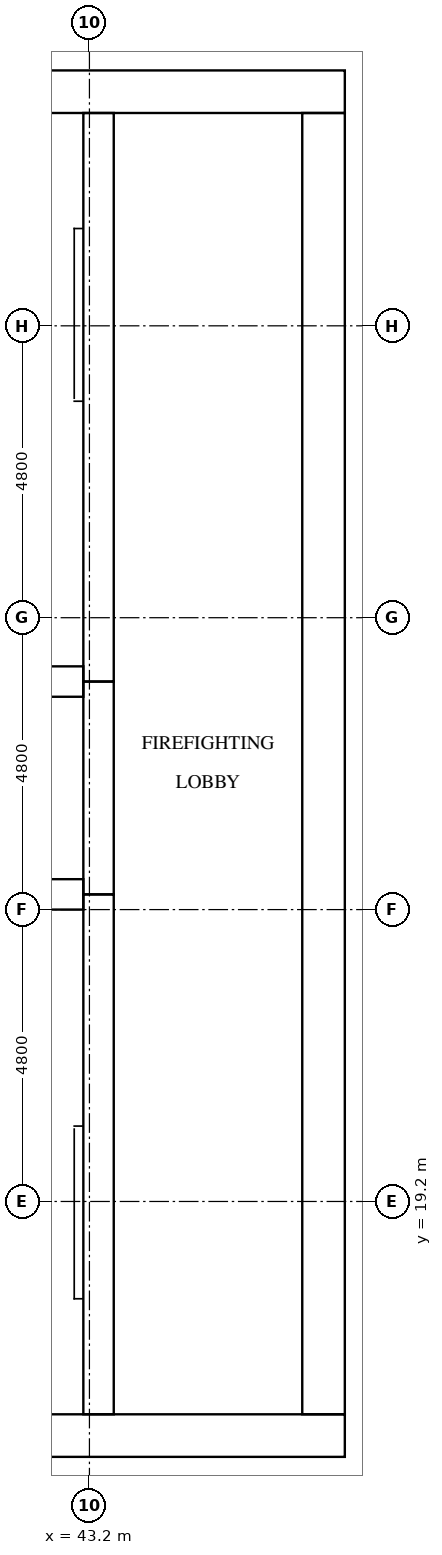
"""IFC4 building model, lengths in metres.
Left out: names, types, materials, properties, quantities, classifications, styles, units other than length and angle.
Written with IfcOpenShell. Run it as: python <this file> out.ifc"""

import sys

from ifc_helpers import new_model, si_unit, direction, frame, frame_2d, origin, place, context, subcontext, project, spatial, rectangle, extrude, element, fill, save


model = new_model("IFC4")
c1 = context("Model", 3, precision=1e-05, world=origin(), true_north=direction((0.0, 1.0)))
c2 = subcontext(c1, "Body", "Model", "MODEL_VIEW")
j1 = project(units=[si_unit("LENGTHUNIT", "METRE"), si_unit("PLANEANGLEUNIT", "RADIAN")], contexts=[c1])
p1 = place(None, origin())
s1 = spatial("IfcSite", under=j1, at=p1, CompositionType="ELEMENT")
p2 = place(p1, origin())
s2 = spatial("IfcBuilding", under=s1, at=p2, CompositionType="ELEMENT")
p3 = place(p2, frame((0.0, 0.0, 199.9)))
s3 = spatial("IfcBuildingStorey", under=s2, at=p3, CompositionType="ELEMENT", Elevation=199.9)
p4 = place(p3, frame((15.0, 15.35, 0.0), z_axis=(0.0, 0.0, 1.0), x_axis=(1.0, 0.0, 0.0)))
e1 = element("IfcWall", 1, at=p4, inside=s3, PredefinedType="SHEAR", context=c2, shape_type="SweptSolid", body=[
    extrude(rectangle(XDim=32.4, YDim=0.7, at=frame_2d((16.2, 0.0))), origin(), (0.0, 0.0, 1.0), 3.1),
])
p5 = place(p4, frame((15.3, 0.0, 0.0)))
e2 = element("IfcOpeningElement", 2, at=p5, cuts=e1, PredefinedType="OPENING", context=c2, shape_type="SweptSolid", body=[
    extrude(rectangle(XDim=1.8, YDim=2.1, at=frame_2d((0.9, 1.05))), frame((0.0, 0.36, 0.0), z_axis=(0.0, -1.0, 0.0), x_axis=(1.0, 0.0, 0.0)), (0.0, 0.0, 1.0), 0.72),
])
p6 = place(p3, frame((15.0, 37.45, 0.0), z_axis=(0.0, 0.0, 1.0), x_axis=(1.0, 0.0, 0.0)))
e3 = element("IfcWall", 3, at=p6, inside=s3, PredefinedType="SHEAR", context=c2, shape_type="SweptSolid", body=[
    extrude(rectangle(XDim=32.4, YDim=0.7, at=frame_2d((16.2, 0.0))), origin(), (0.0, 0.0, 1.0), 3.1),
])
p7 = place(p6, frame((15.3, 0.0, 0.0)))
e4 = element("IfcOpeningElement", 4, at=p7, cuts=e3, PredefinedType="OPENING", context=c2, shape_type="SweptSolid", body=[
    extrude(rectangle(XDim=1.8, YDim=2.1, at=frame_2d((0.9, 1.05))), frame((0.0, 0.36, 0.0), z_axis=(0.0, -1.0, 0.0), x_axis=(1.0, 0.0, 0.0)), (0.0, 0.0, 1.0), 0.72),
])
p8 = place(p6, frame((1.544, 0.0, 0.0)))
e5 = element("IfcOpeningElement", 5, at=p8, cuts=e3, PredefinedType="OPENING", context=c2, shape_type="SweptSolid", body=[
    extrude(rectangle(XDim=1.0, YDim=2.1, at=frame_2d((0.5, 1.05))), frame((0.0, 0.36, 0.0), z_axis=(0.0, -1.0, 0.0), x_axis=(1.0, 0.0, 0.0)), (0.0, 0.0, 1.0), 0.72),
])
p9 = place(p6, frame((5.219, 0.0, 0.0)))
e6 = element("IfcOpeningElement", 6, at=p9, cuts=e3, PredefinedType="OPENING", context=c2, shape_type="SweptSolid", body=[
    extrude(rectangle(XDim=1.0, YDim=2.1, at=frame_2d((0.5, 1.05))), frame((0.0, 0.36, 0.0), z_axis=(0.0, -1.0, 0.0), x_axis=(1.0, 0.0, 0.0)), (0.0, 0.0, 1.0), 0.72),
])
p10 = place(p3, frame((47.05, 15.7, 0.0), z_axis=(0.0, 0.0, 1.0), x_axis=(0.0, 1.0, 0.0)))
e7 = element("IfcWall", 7, at=p10, inside=s3, PredefinedType="SHEAR", context=c2, shape_type="SweptSolid", body=[
    extrude(rectangle(XDim=21.4, YDim=0.7, at=frame_2d((10.7, 0.0))), origin(), (0.0, 0.0, 1.0), 3.1),
])
p11 = place(p10, frame((10.4, 0.0, 0.0)))
e8 = element("IfcOpeningElement", 8, at=p11, cuts=e7, PredefinedType="OPENING", context=c2, shape_type="SweptSolid", body=[
    extrude(rectangle(XDim=1.2, YDim=2.1, at=frame_2d((0.6, 1.05))), frame((0.0, 0.36, 0.0), z_axis=(0.0, -1.0, 0.0), x_axis=(1.0, 0.0, 0.0)), (0.0, 0.0, 1.0), 0.72),
])
p12 = place(p3, frame((43.35, 15.7, 0.0), z_axis=(0.0, 0.0, 1.0), x_axis=(0.0, 1.0, 0.0)))
e9 = element("IfcWall", 9, at=p12, inside=s3, PredefinedType="SHEAR", context=c2, shape_type="SweptSolid", body=[
    extrude(rectangle(XDim=8.55, YDim=0.5, at=frame_2d((4.275, 0.0))), origin(), (0.0, 0.0, 1.0), 3.1),
])
p13 = place(p12, frame((0.5, 0.0, 0.0)))
e10 = element("IfcOpeningElement", 10, at=p13, cuts=e9, PredefinedType="OPENING", context=c2, shape_type="SweptSolid", body=[
    extrude(rectangle(XDim=1.2, YDim=2.1, at=frame_2d((0.6, 1.05))), frame((0.0, 0.26, 0.0), z_axis=(0.0, -1.0, 0.0), x_axis=(1.0, 0.0, 0.0)), (0.0, 0.0, 1.0), 0.52),
])
p14 = place(p3, frame((43.35, 24.25, 0.0), z_axis=(0.0, 0.0, 1.0), x_axis=(0.0, 1.0, 0.0)))
e11 = element("IfcWall", 11, at=p14, inside=s3, PredefinedType="SHEAR", context=c2, shape_type="SweptSolid", body=[
    extrude(rectangle(XDim=3.5, YDim=0.5, at=frame_2d((1.75, 0.0))), origin(), (0.0, 0.0, 1.0), 3.1),
])
p15 = place(p14, frame((1.2, 0.0, 0.0)))
e12 = element("IfcOpeningElement", 12, at=p15, cuts=e11, PredefinedType="OPENING", context=c2, shape_type="SweptSolid", body=[
    extrude(rectangle(XDim=1.1, YDim=2.1, at=frame_2d((0.55, 1.05))), frame((0.0, 0.26, 0.0), z_axis=(0.0, -1.0, 0.0), x_axis=(1.0, 0.0, 0.0)), (0.0, 0.0, 1.0), 0.52),
])
p16 = place(p3, frame((43.35, 27.75, 0.0), z_axis=(0.0, 0.0, 1.0), x_axis=(0.0, 1.0, 0.0)))
e13 = element("IfcWall", 13, at=p16, inside=s3, PredefinedType="SHEAR", context=c2, shape_type="SweptSolid", body=[
    extrude(rectangle(XDim=9.35, YDim=0.5, at=frame_2d((4.675, 0.0))), origin(), (0.0, 0.0, 1.0), 3.1),
])
p17 = place(p16, frame((7.65, 0.0, 0.0)))
e14 = element("IfcOpeningElement", 14, at=p17, cuts=e13, PredefinedType="OPENING", context=c2, shape_type="SweptSolid", body=[
    extrude(rectangle(XDim=1.2, YDim=2.1, at=frame_2d((0.6, 1.05))), frame((0.0, 0.26, 0.0), z_axis=(0.0, -1.0, 0.0), x_axis=(1.0, 0.0, 0.0)), (0.0, 0.0, 1.0), 0.52),
])
for number, where, z_axis, x_axis in (
    (15, (39.55, 24.25, 0.0), (0.0, 0.0, 1.0), (1.0, 0.0, 0.0)),
    (16, (39.55, 27.75, 0.0), (0.0, 0.0, 1.0), (1.0, 0.0, 0.0)),
):
    element("IfcWall", number, at=place(p3, frame(where, z_axis=z_axis, x_axis=x_axis)), inside=s3, PredefinedType="SHEAR", context=c2, shape_type="SweptSolid", body=[
        extrude(rectangle(XDim=3.55, YDim=0.5, at=frame_2d((1.775, 0.0))), origin(), (0.0, 0.0, 1.0), 3.1),
    ])
p18 = place(p15, origin())
e17 = element("IfcDoor", 17, at=p18, inside=s3, OperationType="DOUBLE_DOOR_SLIDING", PredefinedType="DOOR", context=c2, shape_type="SweptSolid", body=[
    extrude(rectangle(XDim=1.1, YDim=2.1, at=frame_2d((0.55, 1.05))), frame((0.0, 0.025, 0.0), z_axis=(0.0, -1.0, 0.0), x_axis=(1.0, 0.0, 0.0)), (0.0, 0.0, 1.0), 0.05),
])
fill(e12, e17)
p19 = place(p13, origin())
e18 = element("IfcDoor", 18, at=p19, inside=s3, OperationType="SINGLE_SWING_LEFT", PredefinedType="DOOR", context=c2, shape_type="SweptSolid", body=[
    extrude(rectangle(XDim=1.2, YDim=2.1, at=frame_2d((0.6, 1.05))), frame((0.0, 0.025, 0.0), z_axis=(0.0, -1.0, 0.0), x_axis=(1.0, 0.0, 0.0)), (0.0, 0.0, 1.0), 0.05),
])
fill(e10, e18)
p20 = place(p17, origin())
e19 = element("IfcDoor", 19, at=p20, inside=s3, OperationType="SINGLE_SWING_RIGHT", PredefinedType="DOOR", context=c2, shape_type="SweptSolid", body=[
    extrude(rectangle(XDim=1.2, YDim=2.1, at=frame_2d((0.6, 1.05))), frame((0.0, 0.025, 0.0), z_axis=(0.0, -1.0, 0.0), x_axis=(1.0, 0.0, 0.0)), (0.0, 0.0, 1.0), 0.05),
])
fill(e14, e19)
p21 = place(p11, origin())
e20 = element("IfcDoor", 20, at=p21, inside=s3, OperationType="SINGLE_SWING_RIGHT", PredefinedType="DOOR", context=c2, shape_type="SweptSolid", body=[
    extrude(rectangle(XDim=1.2, YDim=2.1, at=frame_2d((0.6, 1.05))), frame((0.0, 0.025, 0.0), z_axis=(0.0, -1.0, 0.0), x_axis=(1.0, 0.0, 0.0)), (0.0, 0.0, 1.0), 0.05),
])
fill(e8, e20)
save(model, sys.argv[1])
